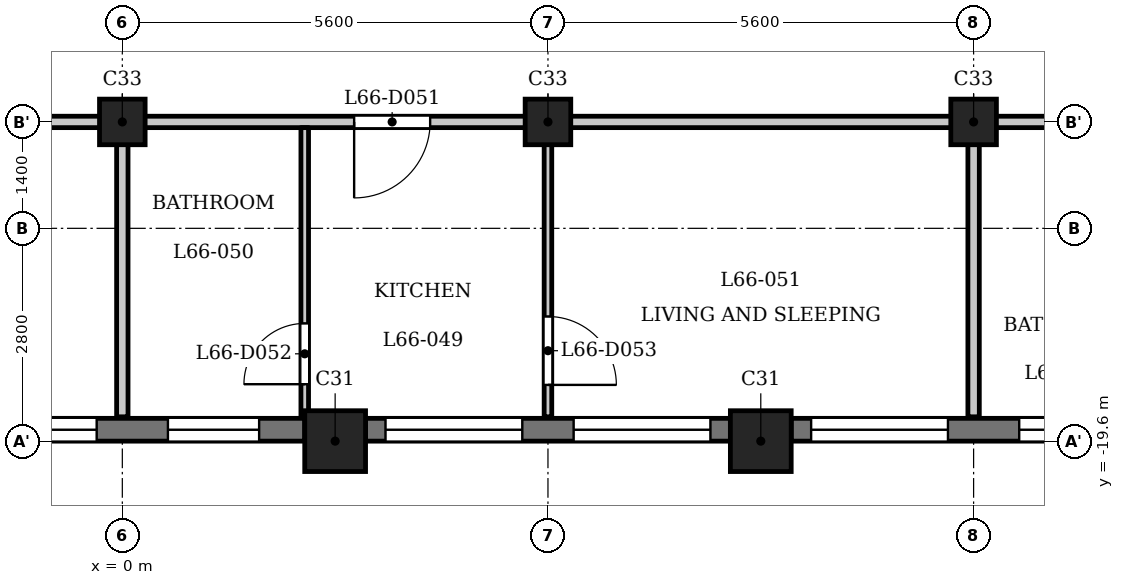
"""IFC4 building model, lengths in metres.
Left out: names, types, materials, properties, quantities, classifications, styles, units other than length and angle.
Written with IfcOpenShell. Run it as: python <this file> out.ifc"""

import sys

from ifc_helpers import new_model, si_unit, direction, frame, frame_2d, origin, origin_2d, place, context, subcontext, project, spatial, rectangle, extrude, element, fill, save


model = new_model("IFC4")
c1 = context("Model", 3, precision=1e-05, world=origin(), true_north=direction((0.0, 1.0)))
c2 = subcontext(c1, "Body", "Model", "MODEL_VIEW")
j1 = project(units=[si_unit("LENGTHUNIT", "METRE"), si_unit("PLANEANGLEUNIT", "RADIAN")], contexts=[c1])
p1 = place(None, origin())
s1 = spatial("IfcSite", under=j1, at=p1, CompositionType="ELEMENT")
p2 = place(p1, origin())
s2 = spatial("IfcBuilding", under=s1, at=p2, CompositionType="ELEMENT")
p3 = place(p2, frame((0.0, 0.0, 255.7)))
s3 = spatial("IfcBuildingStorey", under=s2, at=p3, CompositionType="ELEMENT", Elevation=255.7)
for number, where, z_axis, x_axis in (
    (1, (2.8, -19.6, 0.0), (0.0, 0.0, 1.0), (1.0, 0.0, 0.0)),
    (2, (8.4, -19.6, 0.0), (0.0, 0.0, 1.0), (1.0, 0.0, 0.0)),
):
    element("IfcColumn", number, at=place(p3, frame(where, z_axis=z_axis, x_axis=x_axis)), inside=s3, PredefinedType="COLUMN", context=c2, shape_type="SweptSolid", body=[
        extrude(rectangle(XDim=0.8, YDim=0.8, at=origin_2d()), origin(), (0.0, 0.0, 1.0), 3.5),
    ])
for number, where, z_axis, x_axis in (
    (3, (0.0, -15.4, 0.0), (0.0, 0.0, 1.0), (1.0, 0.0, 0.0)),
    (4, (5.6, -15.4, 0.0), (0.0, 0.0, 1.0), (1.0, 0.0, 0.0)),
    (5, (11.2, -15.4, 0.0), (0.0, 0.0, 1.0), (1.0, 0.0, 0.0)),
):
    element("IfcColumn", number, at=place(p3, frame(where, z_axis=z_axis, x_axis=x_axis)), inside=s3, PredefinedType="COLUMN", context=c2, shape_type="SweptSolid", body=[
        extrude(rectangle(XDim=0.6, YDim=0.6, at=origin_2d()), origin(), (0.0, 0.0, 1.0), 3.5),
    ])
p4 = place(p3, frame((-2.4, -19.45, 0.0), z_axis=(0.0, 0.0, 1.0), x_axis=(1.0, 0.0, 0.0)))
e6 = element("IfcWall", 6, at=p4, inside=s3, PredefinedType="SOLIDWALL", context=c2, shape_type="SweptSolid", body=[
    extrude(rectangle(XDim=4.8, YDim=0.3, at=frame_2d((2.4, 0.0))), origin(), (0.0, 0.0, 1.0), 2.55),
])
p5 = place(p4, frame((0.262, 0.0, 0.9)))
e7 = element("IfcOpeningElement", 7, at=p5, cuts=e6, PredefinedType="OPENING", context=c2, shape_type="SweptSolid", body=[
    extrude(rectangle(XDim=1.8, YDim=1.25, at=frame_2d((0.9, 0.625))), frame((0.0, 0.16, 0.0), z_axis=(0.0, -1.0, 0.0), x_axis=(1.0, 0.0, 0.0)), (0.0, 0.0, 1.0), 0.32),
])
p6 = place(p4, frame((3.0, 0.0, 0.6)))
e8 = element("IfcOpeningElement", 8, at=p6, cuts=e6, PredefinedType="OPENING", context=c2, shape_type="SweptSolid", body=[
    extrude(rectangle(XDim=1.2, YDim=1.55, at=frame_2d((0.6, 0.775))), frame((0.0, 0.16, 0.0), z_axis=(0.0, -1.0, 0.0), x_axis=(1.0, 0.0, 0.0)), (0.0, 0.0, 1.0), 0.32),
])
p7 = place(p3, frame((3.2, -19.45, 0.0), z_axis=(0.0, 0.0, 1.0), x_axis=(1.0, 0.0, 0.0)))
e9 = element("IfcWall", 9, at=p7, inside=s3, PredefinedType="SOLIDWALL", context=c2, shape_type="SweptSolid", body=[
    extrude(rectangle(XDim=4.8, YDim=0.3, at=frame_2d((2.4, 0.0))), origin(), (0.0, 0.0, 1.0), 2.55),
])
p8 = place(p7, frame((0.262, 0.0, 0.9)))
e10 = element("IfcOpeningElement", 10, at=p8, cuts=e9, PredefinedType="OPENING", context=c2, shape_type="SweptSolid", body=[
    extrude(rectangle(XDim=1.8, YDim=1.25, at=frame_2d((0.9, 0.625))), frame((0.0, 0.16, 0.0), z_axis=(0.0, -1.0, 0.0), x_axis=(1.0, 0.0, 0.0)), (0.0, 0.0, 1.0), 0.32),
])
p9 = place(p7, frame((2.738, 0.0, 0.9)))
e11 = element("IfcOpeningElement", 11, at=p9, cuts=e9, PredefinedType="OPENING", context=c2, shape_type="SweptSolid", body=[
    extrude(rectangle(XDim=1.8, YDim=1.25, at=frame_2d((0.9, 0.625))), frame((0.0, 0.16, 0.0), z_axis=(0.0, -1.0, 0.0), x_axis=(1.0, 0.0, 0.0)), (0.0, 0.0, 1.0), 0.32),
])
p10 = place(p3, frame((8.8, -19.45, 0.0), z_axis=(0.0, 0.0, 1.0), x_axis=(1.0, 0.0, 0.0)))
e12 = element("IfcWall", 12, at=p10, inside=s3, PredefinedType="SOLIDWALL", context=c2, shape_type="SweptSolid", body=[
    extrude(rectangle(XDim=4.8, YDim=0.3, at=frame_2d((2.4, 0.0))), origin(), (0.0, 0.0, 1.0), 2.55),
])
p11 = place(p10, frame((0.262, 0.0, 0.9)))
e13 = element("IfcOpeningElement", 13, at=p11, cuts=e12, PredefinedType="OPENING", context=c2, shape_type="SweptSolid", body=[
    extrude(rectangle(XDim=1.8, YDim=1.25, at=frame_2d((0.9, 0.625))), frame((0.0, 0.16, 0.0), z_axis=(0.0, -1.0, 0.0), x_axis=(1.0, 0.0, 0.0)), (0.0, 0.0, 1.0), 0.32),
])
p12 = place(p10, frame((3.0, 0.0, 0.6)))
e14 = element("IfcOpeningElement", 14, at=p12, cuts=e12, PredefinedType="OPENING", context=c2, shape_type="SweptSolid", body=[
    extrude(rectangle(XDim=1.2, YDim=1.55, at=frame_2d((0.6, 0.775))), frame((0.0, 0.16, 0.0), z_axis=(0.0, -1.0, 0.0), x_axis=(1.0, 0.0, 0.0)), (0.0, 0.0, 1.0), 0.32),
])
p13 = place(p3, frame((-23.322, -15.4, 0.0), z_axis=(0.0, 0.0, 1.0), x_axis=(1.0, 0.0, 0.0)))
e15 = element("IfcWall", 15, at=p13, inside=s3, PredefinedType="PARTITIONING", context=c2, shape_type="SweptSolid", body=[
    extrude(rectangle(XDim=46.872, YDim=0.15, at=frame_2d((23.436, 0.0))), origin(), (0.0, 0.0, 1.0), 3.2),
])
p14 = place(p13, frame((7.172, 0.0, 0.0)))
e16 = element("IfcOpeningElement", 16, at=p14, cuts=e15, PredefinedType="OPENING", context=c2, shape_type="SweptSolid", body=[
    extrude(rectangle(XDim=1.0, YDim=2.1, at=frame_2d((0.5, 1.05))), frame((0.0, 0.085, 0.0), z_axis=(0.0, -1.0, 0.0), x_axis=(1.0, 0.0, 0.0)), (0.0, 0.0, 1.0), 0.17),
])
p15 = place(p13, frame((14.922, 0.0, 0.0)))
e17 = element("IfcOpeningElement", 17, at=p15, cuts=e15, PredefinedType="OPENING", context=c2, shape_type="SweptSolid", body=[
    extrude(rectangle(XDim=1.0, YDim=2.1, at=frame_2d((0.5, 1.05))), frame((0.0, 0.085, 0.0), z_axis=(0.0, -1.0, 0.0), x_axis=(1.0, 0.0, 0.0)), (0.0, 0.0, 1.0), 0.17),
])
p16 = place(p13, frame((26.372, 0.0, 0.0)))
e18 = element("IfcOpeningElement", 18, at=p16, cuts=e15, PredefinedType="OPENING", context=c2, shape_type="SweptSolid", body=[
    extrude(rectangle(XDim=1.0, YDim=2.1, at=frame_2d((0.5, 1.05))), frame((0.0, 0.085, 0.0), z_axis=(0.0, -1.0, 0.0), x_axis=(1.0, 0.0, 0.0)), (0.0, 0.0, 1.0), 0.17),
])
p17 = place(p13, frame((38.572, 0.0, 0.0)))
e19 = element("IfcOpeningElement", 19, at=p17, cuts=e15, PredefinedType="OPENING", context=c2, shape_type="SweptSolid", body=[
    extrude(rectangle(XDim=1.0, YDim=2.1, at=frame_2d((0.5, 1.05))), frame((0.0, 0.085, 0.0), z_axis=(0.0, -1.0, 0.0), x_axis=(1.0, 0.0, 0.0)), (0.0, 0.0, 1.0), 0.17),
])
p18 = place(p3, frame((0.0, -19.28, 0.0), z_axis=(0.0, 0.0, 1.0), x_axis=(0.0, 1.0, 0.0)))
e20 = element("IfcWall", 20, at=p18, inside=s3, PredefinedType="PARTITIONING", context=c2, shape_type="SweptSolid", body=[
    extrude(rectangle(XDim=3.805, YDim=0.15, at=frame_2d((1.902, 0.0))), origin(), (0.0, 0.0, 1.0), 3.2),
])
p19 = place(p3, frame((2.4, -19.28, 0.0), z_axis=(0.0, 0.0, 1.0), x_axis=(0.0, 1.0, 0.0)))
e21 = element("IfcWall", 21, at=p19, inside=s3, PredefinedType="PARTITIONING", context=c2, shape_type="SweptSolid", body=[
    extrude(rectangle(XDim=3.805, YDim=0.1, at=frame_2d((1.902, 0.0))), origin(), (0.0, 0.0, 1.0), 3.2),
])
p20 = place(p19, frame((0.429, 0.0, 0.0)))
e22 = element("IfcOpeningElement", 22, at=p20, cuts=e21, PredefinedType="OPENING", context=c2, shape_type="SweptSolid", body=[
    extrude(rectangle(XDim=0.8, YDim=2.1, at=frame_2d((0.4, 1.05))), frame((0.0, 0.06, 0.0), z_axis=(0.0, -1.0, 0.0), x_axis=(1.0, 0.0, 0.0)), (0.0, 0.0, 1.0), 0.12),
])
p21 = place(p3, frame((5.6, -19.28, 0.0), z_axis=(0.0, 0.0, 1.0), x_axis=(0.0, 1.0, 0.0)))
e23 = element("IfcWall", 23, at=p21, inside=s3, PredefinedType="PARTITIONING", context=c2, shape_type="SweptSolid", body=[
    extrude(rectangle(XDim=3.805, YDim=0.1, at=frame_2d((1.902, 0.0))), origin(), (0.0, 0.0, 1.0), 3.2),
])
p22 = place(p21, frame((0.42, 0.0, 0.0)))
e24 = element("IfcOpeningElement", 24, at=p22, cuts=e23, PredefinedType="OPENING", context=c2, shape_type="SweptSolid", body=[
    extrude(rectangle(XDim=0.9, YDim=2.1, at=frame_2d((0.45, 1.05))), frame((0.0, 0.06, 0.0), z_axis=(0.0, -1.0, 0.0), x_axis=(1.0, 0.0, 0.0)), (0.0, 0.0, 1.0), 0.12),
])
p23 = place(p3, frame((11.2, -19.28, 0.0), z_axis=(0.0, 0.0, 1.0), x_axis=(0.0, 1.0, 0.0)))
e25 = element("IfcWall", 25, at=p23, inside=s3, PredefinedType="PARTITIONING", context=c2, shape_type="SweptSolid", body=[
    extrude(rectangle(XDim=3.805, YDim=0.15, at=frame_2d((1.902, 0.0))), origin(), (0.0, 0.0, 1.0), 3.2),
])
p24 = place(p16, origin())
e26 = element("IfcDoor", 26, at=p24, inside=s3, OperationType="SINGLE_SWING_LEFT", PredefinedType="DOOR", context=c2, shape_type="SweptSolid", body=[
    extrude(rectangle(XDim=1.0, YDim=2.1, at=frame_2d((0.5, 1.05))), frame((0.0, 0.025, 0.0), z_axis=(0.0, -1.0, 0.0), x_axis=(1.0, 0.0, 0.0)), (0.0, 0.0, 1.0), 0.05),
])
fill(e18, e26)
p25 = place(p20, origin())
e27 = element("IfcDoor", 27, at=p25, inside=s3, OperationType="SINGLE_SWING_RIGHT", PredefinedType="DOOR", context=c2, shape_type="SweptSolid", body=[
    extrude(rectangle(XDim=0.8, YDim=2.1, at=frame_2d((0.4, 1.05))), frame((0.0, 0.025, 0.0), z_axis=(0.0, -1.0, 0.0), x_axis=(1.0, 0.0, 0.0)), (0.0, 0.0, 1.0), 0.05),
])
fill(e22, e27)
p26 = place(p22, origin())
e28 = element("IfcDoor", 28, at=p26, inside=s3, OperationType="SINGLE_SWING_LEFT", PredefinedType="DOOR", context=c2, shape_type="SweptSolid", body=[
    extrude(rectangle(XDim=0.9, YDim=2.1, at=frame_2d((0.45, 1.05))), frame((0.0, 0.025, 0.0), z_axis=(0.0, -1.0, 0.0), x_axis=(1.0, 0.0, 0.0)), (0.0, 0.0, 1.0), 0.05),
])
fill(e24, e28)
p27 = place(p5, origin())
e29 = element("IfcWindow", 29, at=p27, inside=s3, PartitioningType="SINGLE_PANEL", PredefinedType="WINDOW", context=c2, shape_type="SweptSolid", body=[
    extrude(rectangle(XDim=1.8, YDim=1.25, at=frame_2d((0.9, 0.625))), frame((0.0, 0.03, 0.0), z_axis=(0.0, -1.0, 0.0), x_axis=(1.0, 0.0, 0.0)), (0.0, 0.0, 1.0), 0.06),
])
fill(e7, e29)
p28 = place(p6, origin())
e30 = element("IfcWindow", 30, at=p28, inside=s3, PartitioningType="SINGLE_PANEL", PredefinedType="WINDOW", context=c2, shape_type="SweptSolid", body=[
    extrude(rectangle(XDim=1.2, YDim=1.55, at=frame_2d((0.6, 0.775))), frame((0.0, 0.03, 0.0), z_axis=(0.0, -1.0, 0.0), x_axis=(1.0, 0.0, 0.0)), (0.0, 0.0, 1.0), 0.06),
])
fill(e8, e30)
p29 = place(p8, origin())
e31 = element("IfcWindow", 31, at=p29, inside=s3, PartitioningType="SINGLE_PANEL", PredefinedType="WINDOW", context=c2, shape_type="SweptSolid", body=[
    extrude(rectangle(XDim=1.8, YDim=1.25, at=frame_2d((0.9, 0.625))), frame((0.0, 0.03, 0.0), z_axis=(0.0, -1.0, 0.0), x_axis=(1.0, 0.0, 0.0)), (0.0, 0.0, 1.0), 0.06),
])
fill(e10, e31)
p30 = place(p9, origin())
e32 = element("IfcWindow", 32, at=p30, inside=s3, PartitioningType="SINGLE_PANEL", PredefinedType="WINDOW", context=c2, shape_type="SweptSolid", body=[
    extrude(rectangle(XDim=1.8, YDim=1.25, at=frame_2d((0.9, 0.625))), frame((0.0, 0.03, 0.0), z_axis=(0.0, -1.0, 0.0), x_axis=(1.0, 0.0, 0.0)), (0.0, 0.0, 1.0), 0.06),
])
fill(e11, e32)
p31 = place(p11, origin())
e33 = element("IfcWindow", 33, at=p31, inside=s3, PartitioningType="SINGLE_PANEL", PredefinedType="WINDOW", context=c2, shape_type="SweptSolid", body=[
    extrude(rectangle(XDim=1.8, YDim=1.25, at=frame_2d((0.9, 0.625))), frame((0.0, 0.03, 0.0), z_axis=(0.0, -1.0, 0.0), x_axis=(1.0, 0.0, 0.0)), (0.0, 0.0, 1.0), 0.06),
])
fill(e13, e33)
p32 = place(p12, origin())
e34 = element("IfcWindow", 34, at=p32, inside=s3, PartitioningType="SINGLE_PANEL", PredefinedType="WINDOW", context=c2, shape_type="SweptSolid", body=[
    extrude(rectangle(XDim=1.2, YDim=1.55, at=frame_2d((0.6, 0.775))), frame((0.0, 0.03, 0.0), z_axis=(0.0, -1.0, 0.0), x_axis=(1.0, 0.0, 0.0)), (0.0, 0.0, 1.0), 0.06),
])
fill(e14, e34)
save(model, sys.argv[1])
